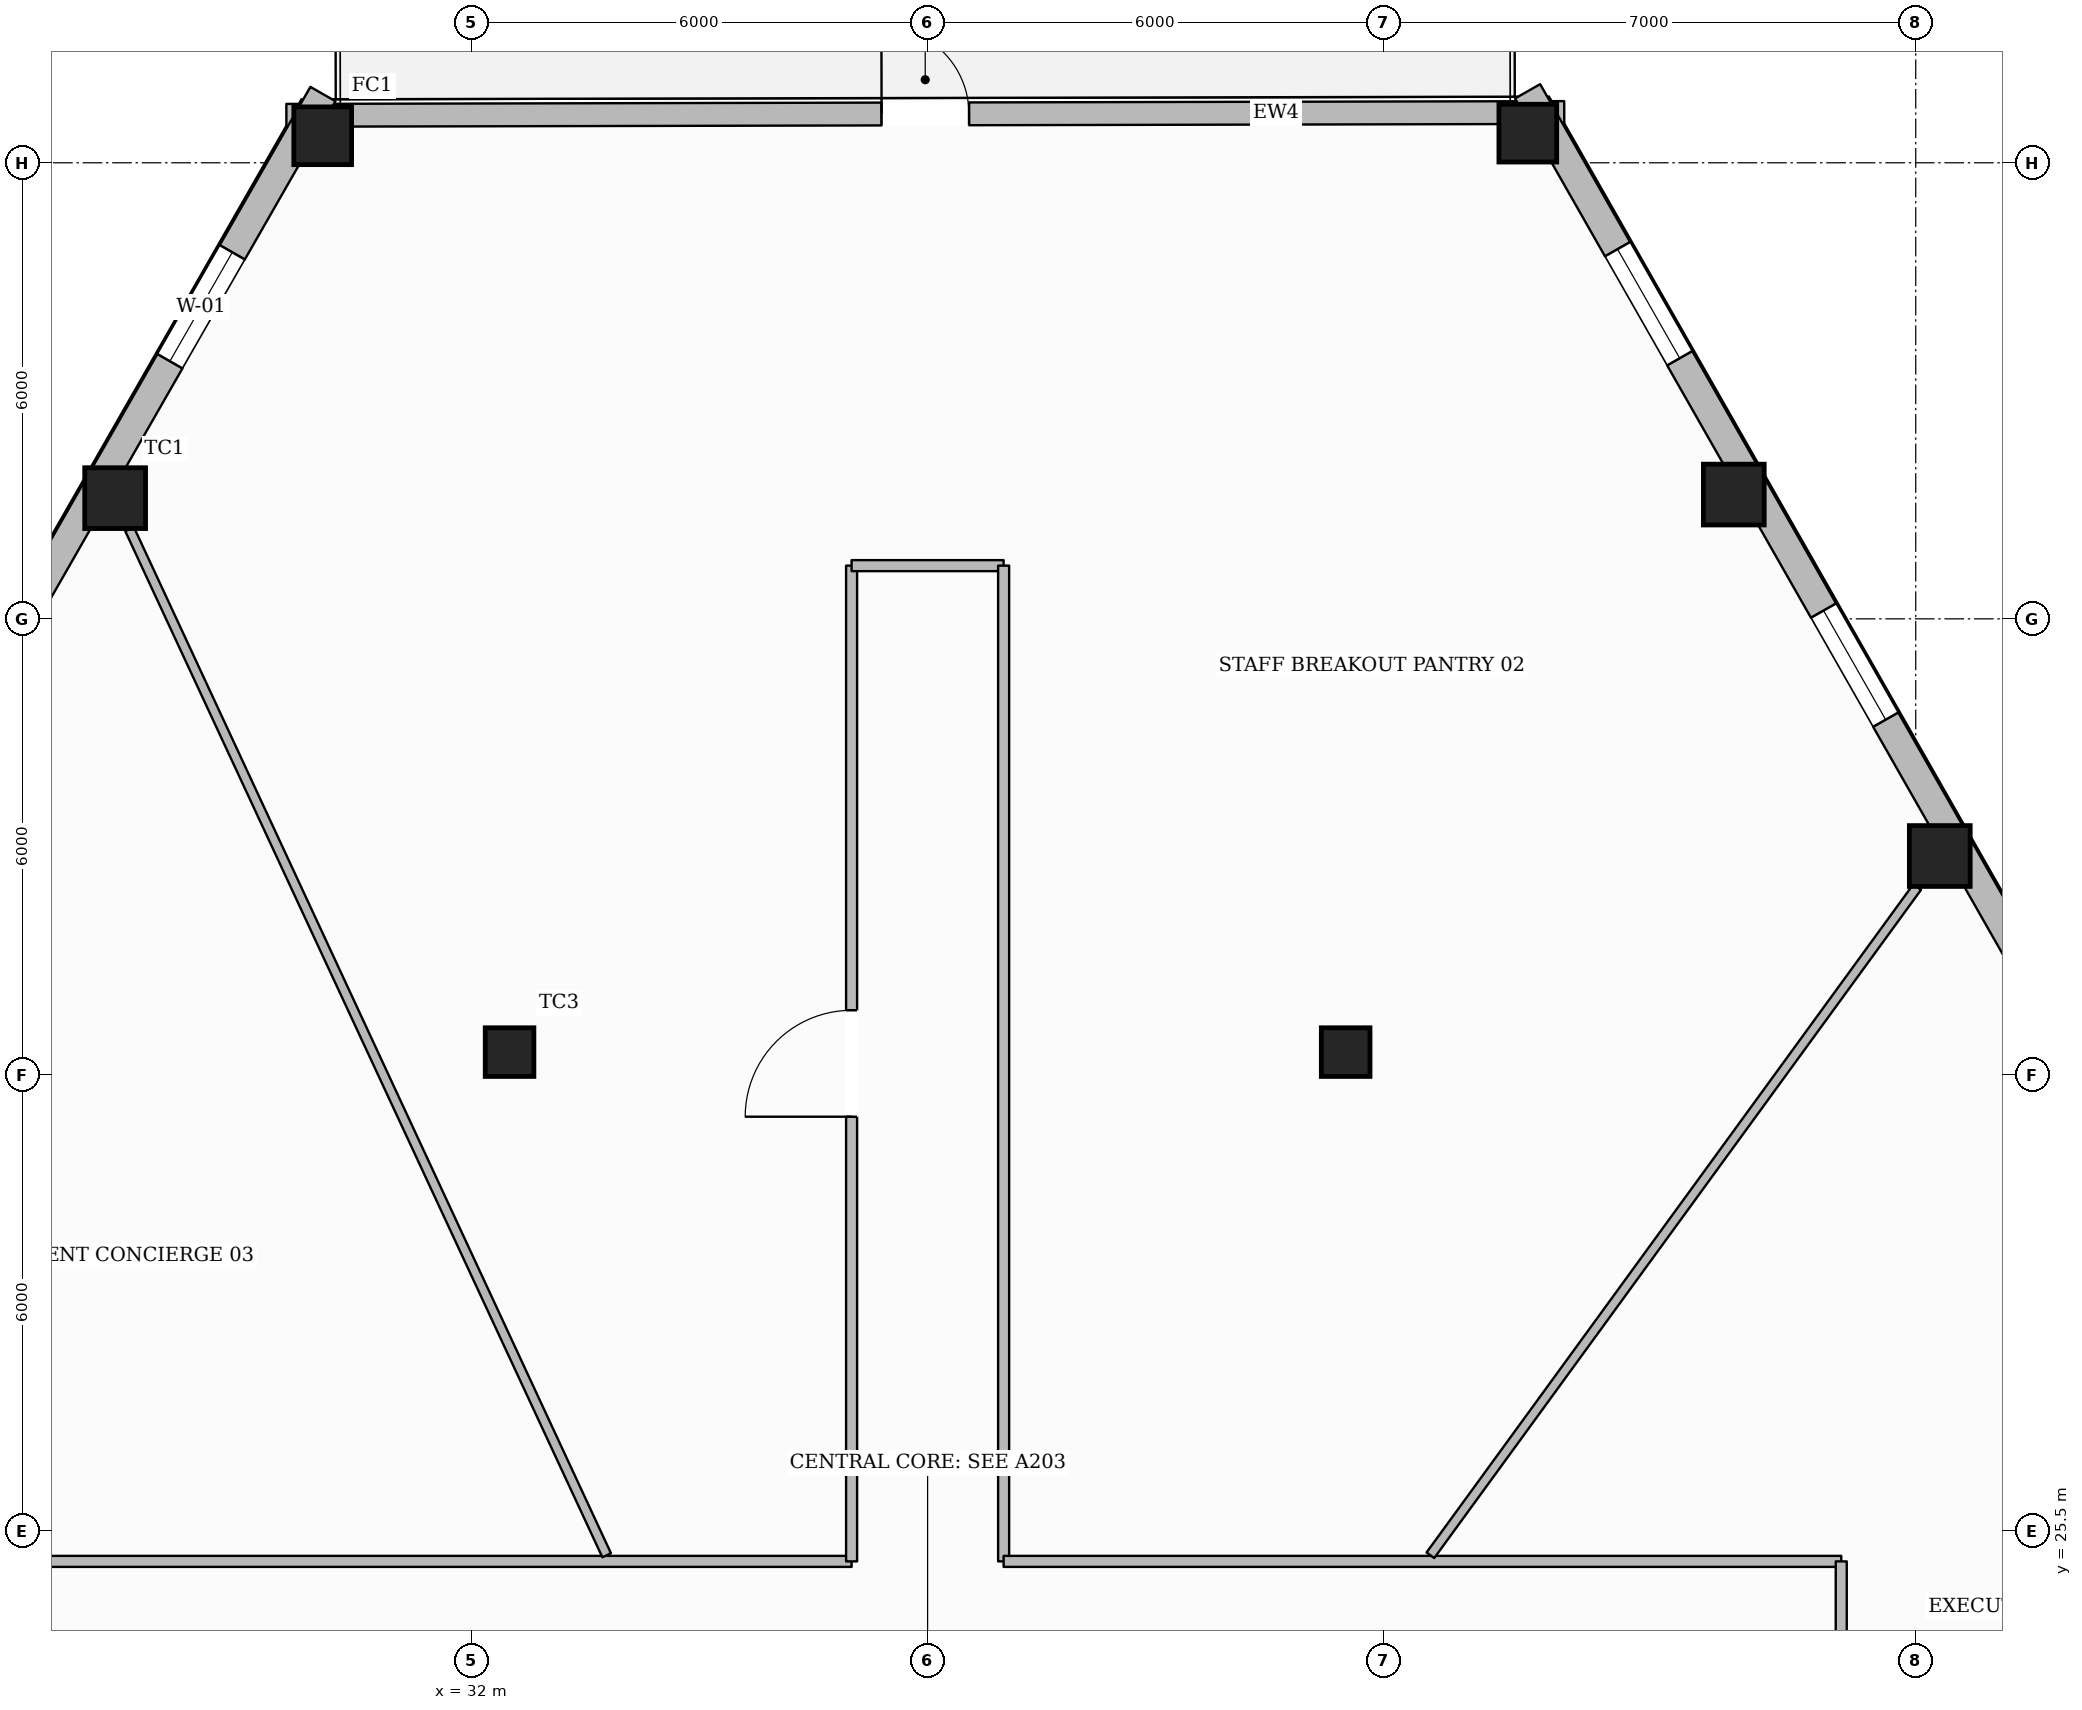
"""IFC4 building model, lengths in metres.
Left out: names, types, materials, properties, quantities, classifications, styles, units other than length and angle.
Written with IfcOpenShell. Run it as: python <this file> out.ifc"""

import sys

from ifc_helpers import new_model, si_unit, direction, frame, frame_2d, origin, origin_2d, place, context, subcontext, project, spatial, rectangle, hollow_rectangle, extrude, element, fill, save


model = new_model("IFC4")
c1 = context("Model", 3, precision=1e-05, world=origin(), true_north=direction((0.0, 1.0)))
c2 = subcontext(c1, "Body", "Model", "MODEL_VIEW")
j1 = project(units=[si_unit("LENGTHUNIT", "METRE"), si_unit("PLANEANGLEUNIT", "RADIAN")], contexts=[c1])
p1 = place(None, origin())
s1 = spatial("IfcSite", under=j1, at=p1, CompositionType="ELEMENT")
p2 = place(p1, origin())
s2 = spatial("IfcBuilding", under=s1, at=p2, CompositionType="ELEMENT")
p3 = place(p2, frame((0.0, 0.0, 17.55)))
s3 = spatial("IfcBuildingStorey", under=s2, at=p3, CompositionType="ELEMENT", Elevation=17.55)
p4 = place(p3, frame((30.042, 43.855, 0.0), z_axis=(0.0, 0.0, 1.0), x_axis=(1.0, 0.0, 0.0)))
e1 = element("IfcColumn", 1, at=p4, inside=s3, PredefinedType="COLUMN", context=c2, shape_type="SweptSolid", body=[
    extrude(hollow_rectangle(XDim=0.76, YDim=0.76, WallThickness=0.035, at=origin_2d()), origin(), (0.0, 0.0, 1.0), 3.59),
])
for number, where, z_axis, x_axis in (
    (2, (27.311, 39.088, 0.0), (0.0, 0.0, 1.0), (1.0, 0.0, 0.0)),
    (3, (51.316, 34.38, 0.0), (0.0, 0.0, 1.0), (1.0, 0.0, 0.0)),
    (4, (48.606, 39.135, 0.0), (0.0, 0.0, 1.0), (1.0, 0.0, 0.0)),
):
    element("IfcColumn", number, at=place(p3, frame(where, z_axis=z_axis, x_axis=x_axis)), inside=s3, PredefinedType="COLUMN", context=c2, shape_type="SweptSolid", body=[
        extrude(hollow_rectangle(XDim=0.8, YDim=0.8, WallThickness=0.036, at=origin_2d()), origin(), (0.0, 0.0, 1.0), 3.59),
    ])
p5 = place(p3, frame((45.896, 43.89, 0.0), z_axis=(0.0, 0.0, 1.0), x_axis=(1.0, 0.0, 0.0)))
e5 = element("IfcColumn", 5, at=p5, inside=s3, PredefinedType="COLUMN", context=c2, shape_type="SweptSolid", body=[
    extrude(hollow_rectangle(XDim=0.76, YDim=0.76, WallThickness=0.035, at=origin_2d()), origin(), (0.0, 0.0, 1.0), 3.59),
])
for number, where, z_axis, x_axis in (
    (6, (32.5, 31.8, 0.0), (0.0, 0.0, 1.0), (1.0, 0.0, 0.0)),
    (7, (43.5, 31.8, 0.0), (0.0, 0.0, 1.0), (1.0, 0.0, 0.0)),
):
    element("IfcColumn", number, at=place(p3, frame(where, z_axis=z_axis, x_axis=x_axis)), inside=s3, PredefinedType="COLUMN", context=c2, shape_type="SweptSolid", body=[
        extrude(hollow_rectangle(XDim=0.64, YDim=0.64, WallThickness=0.028, at=origin_2d()), origin(), (0.0, 0.0, 1.0), 3.59),
    ])
p6 = place(p3, frame((29.564, 44.125, 0.0), z_axis=(0.0, 0.0, 1.0), x_axis=(0.999997659038, 0.002163774142, 0.0)))
e8 = element("IfcWall", 8, at=p6, inside=s3, PredefinedType="STANDARD", context=c2, shape_type="SweptSolid", body=[
    extrude(rectangle(XDim=16.812, YDim=0.3, at=frame_2d((8.406, 0.0))), origin(), (0.0, 0.0, 1.0), 2.97),
])
p7 = place(p6, frame((7.831, 0.0, 0.0)))
e9 = element("IfcOpeningElement", 9, at=p7, cuts=e8, PredefinedType="OPENING", context=c2, shape_type="SweptSolid", body=[
    extrude(rectangle(XDim=1.15, YDim=2.2, at=frame_2d((0.575, 1.1))), frame((0.0, 0.16, 0.0), z_axis=(0.0, -1.0, 0.0), x_axis=(1.0, 0.0, 0.0)), (0.0, 0.0, 1.0), 0.32),
])
p8 = place(p3, frame((13.187, 14.973, 0.0), z_axis=(0.0, 0.0, 1.0), x_axis=(0.497033240721, 0.867731500879, 0.0)))
e10 = element("IfcWall", 10, at=p8, inside=s3, PredefinedType="STANDARD", context=c2, shape_type="SweptSolid", body=[
    extrude(rectangle(XDim=33.917, YDim=0.38, at=frame_2d((16.958, 0.0))), origin(), (0.0, 0.0, 1.0), 2.97),
])
p9 = place(p8, frame((29.867, 0.0, 0.65)))
e11 = element("IfcOpeningElement", 11, at=p9, cuts=e10, PredefinedType="OPENING", context=c2, shape_type="SweptSolid", body=[
    extrude(rectangle(XDim=1.65, YDim=1.75, at=frame_2d((0.825, 0.875))), frame((0.0, 0.2, 0.0), z_axis=(0.0, -1.0, 0.0), x_axis=(1.0, 0.0, 0.0)), (0.0, 0.0, 1.0), 0.4),
])
p10 = place(p8, frame((24.373, 0.0, 0.65)))
e12 = element("IfcOpeningElement", 12, at=p10, cuts=e10, PredefinedType="OPENING", context=c2, shape_type="SweptSolid", body=[
    extrude(rectangle(XDim=1.65, YDim=1.75, at=frame_2d((0.825, 0.875))), frame((0.0, 0.2, 0.0), z_axis=(0.0, -1.0, 0.0), x_axis=(1.0, 0.0, 0.0)), (0.0, 0.0, 1.0), 0.4),
])
p11 = place(p8, frame((7.89, 0.0, 0.65)))
e13 = element("IfcOpeningElement", 13, at=p11, cuts=e10, PredefinedType="OPENING", context=c2, shape_type="SweptSolid", body=[
    extrude(rectangle(XDim=1.65, YDim=1.75, at=frame_2d((0.825, 0.875))), frame((0.0, 0.2, 0.0), z_axis=(0.0, -1.0, 0.0), x_axis=(1.0, 0.0, 0.0)), (0.0, 0.0, 1.0), 0.4),
])
p12 = place(p8, frame((2.396, 0.0, 0.65)))
e14 = element("IfcOpeningElement", 14, at=p12, cuts=e10, PredefinedType="OPENING", context=c2, shape_type="SweptSolid", body=[
    extrude(rectangle(XDim=1.65, YDim=1.75, at=frame_2d((0.825, 0.875))), frame((0.0, 0.2, 0.0), z_axis=(0.0, -1.0, 0.0), x_axis=(1.0, 0.0, 0.0)), (0.0, 0.0, 1.0), 0.4),
])
p13 = place(p3, frame((45.894, 44.44, 0.0), z_axis=(0.0, 0.0, 1.0), x_axis=(0.495144258579, -0.868810775253, 0.0)))
e15 = element("IfcWall", 15, at=p13, inside=s3, PredefinedType="STANDARD", context=c2, shape_type="SweptSolid", body=[
    extrude(rectangle(XDim=33.792, YDim=0.38, at=frame_2d((16.896, 0.0))), origin(), (0.0, 0.0, 1.0), 2.97),
])
p14 = place(p13, frame((24.744, 0.0, 0.0)))
e16 = element("IfcOpeningElement", 16, at=p14, cuts=e15, PredefinedType="OPENING", context=c2, shape_type="SweptSolid", body=[
    extrude(rectangle(XDim=1.0, YDim=2.2, at=frame_2d((0.5, 1.1))), frame((0.0, 0.2, 0.0), z_axis=(0.0, -1.0, 0.0), x_axis=(1.0, 0.0, 0.0)), (0.0, 0.0, 1.0), 0.4),
])
p15 = place(p13, frame((29.756, 0.0, 0.65)))
e17 = element("IfcOpeningElement", 17, at=p15, cuts=e15, PredefinedType="OPENING", context=c2, shape_type="SweptSolid", body=[
    extrude(rectangle(XDim=1.65, YDim=1.75, at=frame_2d((0.825, 0.875))), frame((0.0, 0.2, 0.0), z_axis=(0.0, -1.0, 0.0), x_axis=(1.0, 0.0, 0.0)), (0.0, 0.0, 1.0), 0.4),
])
p16 = place(p13, frame((18.81, 0.0, 0.65)))
e18 = element("IfcOpeningElement", 18, at=p16, cuts=e15, PredefinedType="OPENING", context=c2, shape_type="SweptSolid", body=[
    extrude(rectangle(XDim=1.65, YDim=1.75, at=frame_2d((0.825, 0.875))), frame((0.0, 0.2, 0.0), z_axis=(0.0, -1.0, 0.0), x_axis=(1.0, 0.0, 0.0)), (0.0, 0.0, 1.0), 0.4),
])
p17 = place(p13, frame((7.864, 0.0, 0.65)))
e19 = element("IfcOpeningElement", 19, at=p17, cuts=e15, PredefinedType="OPENING", context=c2, shape_type="SweptSolid", body=[
    extrude(rectangle(XDim=1.65, YDim=1.75, at=frame_2d((0.825, 0.875))), frame((0.0, 0.2, 0.0), z_axis=(0.0, -1.0, 0.0), x_axis=(1.0, 0.0, 0.0)), (0.0, 0.0, 1.0), 0.4),
])
p18 = place(p13, frame((2.391, 0.0, 0.65)))
e20 = element("IfcOpeningElement", 20, at=p18, cuts=e15, PredefinedType="OPENING", context=c2, shape_type="SweptSolid", body=[
    extrude(rectangle(XDim=1.65, YDim=1.75, at=frame_2d((0.825, 0.875))), frame((0.0, 0.2, 0.0), z_axis=(0.0, -1.0, 0.0), x_axis=(1.0, 0.0, 0.0)), (0.0, 0.0, 1.0), 0.4),
])
p19 = place(p3, frame((25.98, 25.1, 0.0), z_axis=(0.0, 0.0, 1.0), x_axis=(1.0, 0.0, 0.0)))
e21 = element("IfcWall", 21, at=p19, inside=s3, PredefinedType="PARTITIONING", context=c2, shape_type="SweptSolid", body=[
    extrude(rectangle(XDim=11.02, YDim=0.145, at=frame_2d((5.51, 0.0))), origin(), (0.0, 0.0, 1.0), 3.59),
])
p20 = place(p3, frame((37.0, 25.1, 0.0), z_axis=(0.0, 0.0, 1.0), x_axis=(0.0, 1.0, 0.0)))
e22 = element("IfcWall", 22, at=p20, inside=s3, PredefinedType="PARTITIONING", context=c2, shape_type="SweptSolid", body=[
    extrude(rectangle(XDim=13.1, YDim=0.145, at=frame_2d((6.55, 0.0))), origin(), (0.0, 0.0, 1.0), 3.59),
])
p21 = place(p20, frame((5.85, 0.0, 0.0)))
e23 = element("IfcOpeningElement", 23, at=p21, cuts=e22, PredefinedType="OPENING", context=c2, shape_type="SweptSolid", body=[
    extrude(rectangle(XDim=1.4, YDim=2.2, at=frame_2d((0.7, 1.1))), frame((0.0, 0.083, 0.0), z_axis=(0.0, -1.0, 0.0), x_axis=(1.0, 0.0, 0.0)), (0.0, 0.0, 1.0), 0.165),
])
p22 = place(p3, frame((37.0, 38.2, 0.0), z_axis=(0.0, 0.0, 1.0), x_axis=(1.0, 0.0, 0.0)))
e24 = element("IfcWall", 24, at=p22, inside=s3, PredefinedType="PARTITIONING", context=c2, shape_type="SweptSolid", body=[
    extrude(rectangle(XDim=2.0, YDim=0.145, at=frame_2d((1.0, 0.0))), origin(), (0.0, 0.0, 1.0), 3.59),
])
p23 = place(p3, frame((39.0, 38.2, 0.0), z_axis=(0.0, 0.0, 1.0), x_axis=(0.0, -1.0, 0.0)))
e25 = element("IfcWall", 25, at=p23, inside=s3, PredefinedType="PARTITIONING", context=c2, shape_type="SweptSolid", body=[
    extrude(rectangle(XDim=13.1, YDim=0.145, at=frame_2d((6.55, 0.0))), origin(), (0.0, 0.0, 1.0), 3.59),
])
p24 = place(p3, frame((39.0, 25.1, 0.0), z_axis=(0.0, 0.0, 1.0), x_axis=(1.0, 0.0, 0.0)))
e26 = element("IfcWall", 26, at=p24, inside=s3, PredefinedType="PARTITIONING", context=c2, shape_type="SweptSolid", body=[
    extrude(rectangle(XDim=11.02, YDim=0.145, at=frame_2d((5.51, 0.0))), origin(), (0.0, 0.0, 1.0), 3.59),
])
p25 = place(p3, frame((50.02, 25.1, 0.0), z_axis=(0.0, 0.0, 1.0), x_axis=(0.0, -1.0, 0.0)))
e27 = element("IfcWall", 27, at=p25, inside=s3, PredefinedType="PARTITIONING", context=c2, shape_type="SweptSolid", body=[
    extrude(rectangle(XDim=16.0, YDim=0.145, at=frame_2d((8.0, 0.0))), origin(), (0.0, 0.0, 1.0), 3.278),
])
p26 = place(p25, frame((2.752, 0.0, 0.0)))
e28 = element("IfcOpeningElement", 28, at=p26, cuts=e27, PredefinedType="OPENING", context=c2, shape_type="SweptSolid", body=[
    extrude(rectangle(XDim=1.4, YDim=2.2, at=frame_2d((0.7, 1.1))), frame((0.0, 0.083, 0.0), z_axis=(0.0, -1.0, 0.0), x_axis=(1.0, 0.0, 0.0)), (0.0, 0.0, 1.0), 0.165),
])
p27 = place(p25, frame((10.582, 0.0, 0.0)))
e29 = element("IfcOpeningElement", 29, at=p27, cuts=e27, PredefinedType="OPENING", context=c2, shape_type="SweptSolid", body=[
    extrude(rectangle(XDim=1.4, YDim=2.2, at=frame_2d((0.7, 1.1))), frame((0.0, 0.083, 0.0), z_axis=(0.0, -1.0, 0.0), x_axis=(1.0, 0.0, 0.0)), (0.0, 0.0, 1.0), 0.165),
])
p28 = place(p3, frame((44.615, 25.18, 0.0), z_axis=(0.0, 0.0, 1.0), x_axis=(0.588797479065, 0.808280600192, 0.0)))
e30 = element("IfcWall", 30, at=p28, inside=s3, PredefinedType="PARTITIONING", context=c2, shape_type="SweptSolid", body=[
    extrude(rectangle(XDim=10.876, YDim=0.125, at=frame_2d((5.438, 0.0))), origin(), (0.0, 0.0, 1.0), 3.057),
])
p29 = place(p3, frame((33.778, 25.18, 0.0), z_axis=(0.0, 0.0, 1.0), x_axis=(-0.421621006058, 0.906772147373, 0.0)))
e31 = element("IfcWall", 31, at=p29, inside=s3, PredefinedType="PARTITIONING", context=c2, shape_type="SweptSolid", body=[
    extrude(rectangle(XDim=14.887, YDim=0.125, at=frame_2d((7.444, 0.0))), origin(), (0.0, 0.0, 1.0), 3.057),
])
p30 = place(p7, origin())
e32 = element("IfcDoor", 32, at=p30, inside=s3, OperationType="SINGLE_SWING_LEFT", PredefinedType="DOOR", context=c2, shape_type="SweptSolid", body=[
    extrude(rectangle(XDim=1.15, YDim=2.2, at=frame_2d((0.575, 1.1))), frame((0.0, 0.025, 0.0), z_axis=(0.0, -1.0, 0.0), x_axis=(1.0, 0.0, 0.0)), (0.0, 0.0, 1.0), 0.05),
])
fill(e9, e32)
p31 = place(p9, origin())
e33 = element("IfcWindow", 33, at=p31, inside=s3, PartitioningType="SINGLE_PANEL", PredefinedType="WINDOW", context=c2, shape_type="SweptSolid", body=[
    extrude(rectangle(XDim=1.65, YDim=1.75, at=frame_2d((0.825, 0.875))), frame((0.0, 0.03, 0.0), z_axis=(0.0, -1.0, 0.0), x_axis=(1.0, 0.0, 0.0)), (0.0, 0.0, 1.0), 0.06),
])
fill(e11, e33)
p32 = place(p17, origin())
e34 = element("IfcWindow", 34, at=p32, inside=s3, PartitioningType="SINGLE_PANEL", PredefinedType="WINDOW", context=c2, shape_type="SweptSolid", body=[
    extrude(rectangle(XDim=1.65, YDim=1.75, at=frame_2d((0.825, 0.875))), frame((0.0, 0.03, 0.0), z_axis=(0.0, -1.0, 0.0), x_axis=(1.0, 0.0, 0.0)), (0.0, 0.0, 1.0), 0.06),
])
fill(e19, e34)
p33 = place(p18, origin())
e35 = element("IfcWindow", 35, at=p33, inside=s3, PartitioningType="SINGLE_PANEL", PredefinedType="WINDOW", context=c2, shape_type="SweptSolid", body=[
    extrude(rectangle(XDim=1.65, YDim=1.75, at=frame_2d((0.825, 0.875))), frame((0.0, 0.03, 0.0), z_axis=(0.0, -1.0, 0.0), x_axis=(1.0, 0.0, 0.0)), (0.0, 0.0, 1.0), 0.06),
])
fill(e20, e35)
p34 = place(p21, origin())
e36 = element("IfcDoor", 36, at=p34, inside=s3, OperationType="SINGLE_SWING_LEFT", PredefinedType="DOOR", context=c2, shape_type="SweptSolid", body=[
    extrude(rectangle(XDim=1.4, YDim=2.2, at=frame_2d((0.7, 1.1))), frame((0.0, 0.025, 0.0), z_axis=(0.0, -1.0, 0.0), x_axis=(1.0, 0.0, 0.0)), (0.0, 0.0, 1.0), 0.05),
])
fill(e23, e36)
save(model, sys.argv[1])
